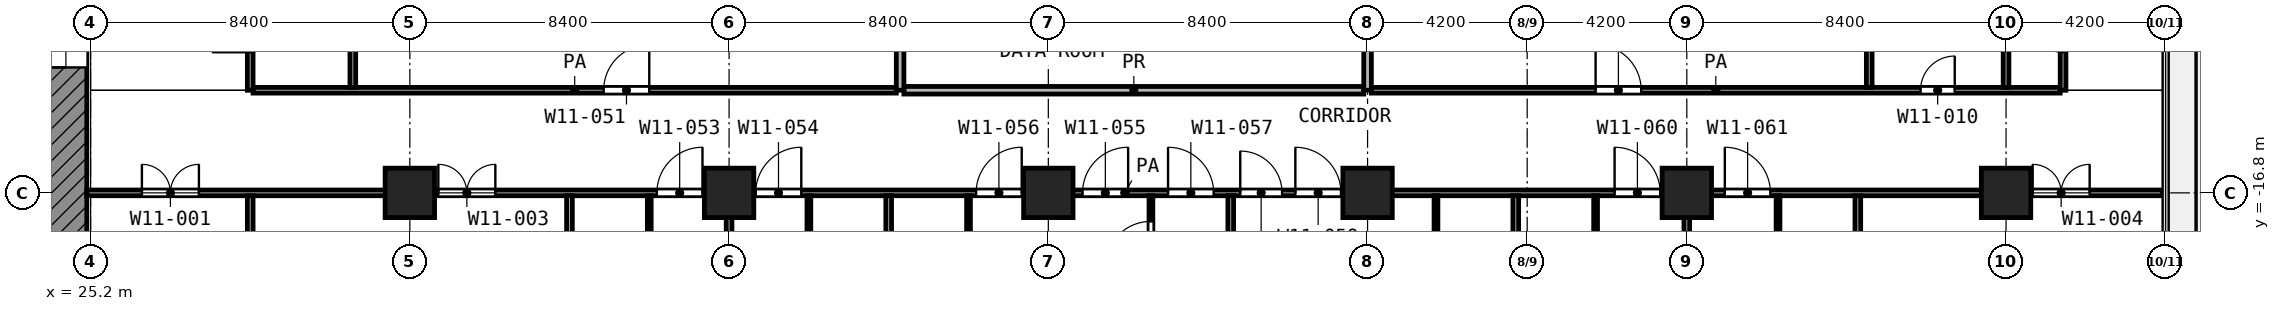
"""IFC4 building model, lengths in metres.
Left out: names, types, materials, properties, quantities, classifications, styles, units other than length and angle.
Written with IfcOpenShell. Run it as: python <this file> out.ifc"""

import sys

from ifc_helpers import new_model, si_unit, direction, frame, frame_2d, origin, origin_2d, place, context, subcontext, project, spatial, rectangle, extrude, element, fill, save


model = new_model("IFC4")
c1 = context("Model", 3, precision=1e-05, world=origin(), true_north=direction((0.0, 1.0)))
c2 = subcontext(c1, "Body", "Model", "MODEL_VIEW")
j1 = project(units=[si_unit("LENGTHUNIT", "METRE"), si_unit("PLANEANGLEUNIT", "RADIAN")], contexts=[c1])
p1 = place(None, origin())
s1 = spatial("IfcSite", under=j1, at=p1, CompositionType="ELEMENT")
p2 = place(p1, origin())
s2 = spatial("IfcBuilding", under=s1, at=p2, CompositionType="ELEMENT")
p3 = place(p2, frame((0.0, 0.0, 51.8)))
s3 = spatial("IfcBuildingStorey", under=s2, at=p3, CompositionType="ELEMENT", Elevation=51.8)
for number, where, z_axis, x_axis in (
    (1, (33.6, -16.8, 0.0), (0.0, 0.0, 1.0), (1.0, 0.0, 0.0)),
    (2, (42.0, -16.8, 0.0), (0.0, 0.0, 1.0), (1.0, 0.0, 0.0)),
    (3, (50.4, -16.8, 0.0), (0.0, 0.0, 1.0), (1.0, 0.0, 0.0)),
    (4, (58.8, -16.8, 0.0), (0.0, 0.0, 1.0), (1.0, 0.0, 0.0)),
    (5, (67.2, -16.8, 0.0), (0.0, 0.0, 1.0), (1.0, 0.0, 0.0)),
    (6, (75.6, -16.8, 0.0), (0.0, 0.0, 1.0), (1.0, 0.0, 0.0)),
):
    element("IfcColumn", number, at=place(p3, frame(where, z_axis=z_axis, x_axis=x_axis)), inside=s3, PredefinedType="COLUMN", context=c2, shape_type="SweptSolid", body=[
        extrude(rectangle(XDim=1.3, YDim=1.3, at=origin_2d()), origin(), (0.0, 0.0, 1.0), 4.2),
    ])
p4 = place(p3, frame((24.55, -24.0, 0.0), z_axis=(0.0, 0.0, 1.0), x_axis=(0.0, 1.0, 0.0)))
e7 = element("IfcWall", 7, at=p4, inside=s3, PredefinedType="SHEAR", context=c2, shape_type="SweptSolid", body=[
    extrude(rectangle(XDim=18.6, YDim=1.1, at=frame_2d((9.3, 0.0))), origin(), (0.0, 0.0, 1.0), 3.9),
])
p5 = place(p4, frame((10.5, 0.0, 0.0)))
e8 = element("IfcOpeningElement", 8, at=p5, cuts=e7, PredefinedType="OPENING", context=c2, shape_type="SweptSolid", body=[
    extrude(rectangle(XDim=1.8, YDim=2.1, at=frame_2d((0.9, 1.05))), frame((0.0, 0.56, 0.0), z_axis=(0.0, -1.0, 0.0), x_axis=(1.0, 0.0, 0.0)), (0.0, 0.0, 1.0), 1.12),
])
p6 = place(p3, frame((39.9, -20.1, 0.0), z_axis=(0.0, 0.0, 1.0), x_axis=(0.0, 1.0, 0.0)))
e9 = element("IfcWall", 9, at=p6, inside=s3, PredefinedType="PARTITIONING", context=c2, shape_type="SweptSolid", body=[
    extrude(rectangle(XDim=3.225, YDim=0.1, at=frame_2d((1.613, 0.0))), origin(), (0.0, 0.0, 1.0), 3.9),
])
for number, where, z_axis, x_axis in (
    (10, (44.1, -19.5, 0.0), (0.0, 0.0, 1.0), (0.0, 1.0, 0.0)),
    (11, (48.3, -19.5, 0.0), (0.0, 0.0, 1.0), (0.0, 1.0, 0.0)),
):
    element("IfcWall", number, at=place(p3, frame(where, z_axis=z_axis, x_axis=x_axis)), inside=s3, PredefinedType="PARTITIONING", context=c2, shape_type="SweptSolid", body=[
        extrude(rectangle(XDim=2.625, YDim=0.1, at=frame_2d((1.312, 0.0))), origin(), (0.0, 0.0, 1.0), 3.9),
    ])
p7 = place(p3, frame((53.1, -19.5, 0.0), z_axis=(0.0, 0.0, 1.0), x_axis=(0.0, 1.0, 0.0)))
e12 = element("IfcWall", 12, at=p7, inside=s3, PredefinedType="PARTITIONING", context=c2, shape_type="SweptSolid", body=[
    extrude(rectangle(XDim=2.625, YDim=0.1, at=frame_2d((1.312, 0.0))), origin(), (0.0, 0.0, 1.0), 3.9),
])
p8 = place(p7, frame((0.75, 0.0, 0.0)))
e13 = element("IfcOpeningElement", 13, at=p8, cuts=e12, PredefinedType="OPENING", context=c2, shape_type="SweptSolid", body=[
    extrude(rectangle(XDim=1.2, YDim=2.1, at=frame_2d((0.6, 1.05))), frame((0.0, 0.06, 0.0), z_axis=(0.0, -1.0, 0.0), x_axis=(1.0, 0.0, 0.0)), (0.0, 0.0, 1.0), 0.12),
])
p9 = place(p3, frame((60.6, -19.499, 0.0), z_axis=(0.0, 0.0, 1.0), x_axis=(0.0, 1.0, 0.0)))
e14 = element("IfcWall", 14, at=p9, inside=s3, PredefinedType="PARTITIONING", context=c2, shape_type="SweptSolid", body=[
    extrude(rectangle(XDim=2.624, YDim=0.1, at=frame_2d((1.312, 0.0))), origin(), (0.0, 0.0, 1.0), 3.9),
])
p10 = place(p3, frame((64.8, -20.1, 0.0), z_axis=(0.0, 0.0, 1.0), x_axis=(0.0, 1.0, 0.0)))
e15 = element("IfcWall", 15, at=p10, inside=s3, PredefinedType="PARTITIONING", context=c2, shape_type="SweptSolid", body=[
    extrude(rectangle(XDim=3.225, YDim=0.1, at=frame_2d((1.613, 0.0))), origin(), (0.0, 0.0, 1.0), 3.9),
])
p11 = place(p3, frame((69.6, -19.5, 0.0), z_axis=(0.0, 0.0, 1.0), x_axis=(0.0, 1.0, 0.0)))
e16 = element("IfcWall", 16, at=p11, inside=s3, PredefinedType="PARTITIONING", context=c2, shape_type="SweptSolid", body=[
    extrude(rectangle(XDim=2.625, YDim=0.1, at=frame_2d((1.312, 0.0))), origin(), (0.0, 0.0, 1.0), 3.9),
])
p12 = place(p3, frame((25.1, -16.8, 0.0), z_axis=(0.0, 0.0, 1.0), x_axis=(1.0, 0.0, 0.0)))
e17 = element("IfcWall", 17, at=p12, inside=s3, PredefinedType="PARTITIONING", context=c2, shape_type="SweptSolid", body=[
    extrude(rectangle(XDim=54.62, YDim=0.15, at=frame_2d((27.31, 0.0))), origin(), (0.0, 0.0, 1.0), 3.9),
])
p13 = place(p12, frame((1.45, 0.0, 0.0)))
e18 = element("IfcOpeningElement", 18, at=p13, cuts=e17, PredefinedType="OPENING", context=c2, shape_type="SweptSolid", body=[
    extrude(rectangle(XDim=1.5, YDim=2.1, at=frame_2d((0.75, 1.05))), frame((0.0, 0.085, 0.0), z_axis=(0.0, -1.0, 0.0), x_axis=(1.0, 0.0, 0.0)), (0.0, 0.0, 1.0), 0.17),
])
p14 = place(p12, frame((9.25, 0.0, 0.0)))
e19 = element("IfcOpeningElement", 19, at=p14, cuts=e17, PredefinedType="OPENING", context=c2, shape_type="SweptSolid", body=[
    extrude(rectangle(XDim=1.5, YDim=2.1, at=frame_2d((0.75, 1.05))), frame((0.0, 0.085, 0.0), z_axis=(0.0, -1.0, 0.0), x_axis=(1.0, 0.0, 0.0)), (0.0, 0.0, 1.0), 0.17),
])
p15 = place(p12, frame((15.0, 0.0, 0.0)))
e20 = element("IfcOpeningElement", 20, at=p15, cuts=e17, PredefinedType="OPENING", context=c2, shape_type="SweptSolid", body=[
    extrude(rectangle(XDim=1.2, YDim=2.1, at=frame_2d((0.6, 1.05))), frame((0.0, 0.085, 0.0), z_axis=(0.0, -1.0, 0.0), x_axis=(1.0, 0.0, 0.0)), (0.0, 0.0, 1.0), 0.17),
])
p16 = place(p12, frame((17.6, 0.0, 0.0)))
e21 = element("IfcOpeningElement", 21, at=p16, cuts=e17, PredefinedType="OPENING", context=c2, shape_type="SweptSolid", body=[
    extrude(rectangle(XDim=1.2, YDim=2.1, at=frame_2d((0.6, 1.05))), frame((0.0, 0.085, 0.0), z_axis=(0.0, -1.0, 0.0), x_axis=(1.0, 0.0, 0.0)), (0.0, 0.0, 1.0), 0.17),
])
p17 = place(p12, frame((26.2, 0.0, 0.0)))
e22 = element("IfcOpeningElement", 22, at=p17, cuts=e17, PredefinedType="OPENING", context=c2, shape_type="SweptSolid", body=[
    extrude(rectangle(XDim=1.2, YDim=2.1, at=frame_2d((0.6, 1.05))), frame((0.0, 0.085, 0.0), z_axis=(0.0, -1.0, 0.0), x_axis=(1.0, 0.0, 0.0)), (0.0, 0.0, 1.0), 0.17),
])
p18 = place(p12, frame((23.4, 0.0, 0.0)))
e23 = element("IfcOpeningElement", 23, at=p18, cuts=e17, PredefinedType="OPENING", context=c2, shape_type="SweptSolid", body=[
    extrude(rectangle(XDim=1.2, YDim=2.1, at=frame_2d((0.6, 1.05))), frame((0.0, 0.085, 0.0), z_axis=(0.0, -1.0, 0.0), x_axis=(1.0, 0.0, 0.0)), (0.0, 0.0, 1.0), 0.17),
])
p19 = place(p12, frame((28.45, 0.0, 0.0)))
e24 = element("IfcOpeningElement", 24, at=p19, cuts=e17, PredefinedType="OPENING", context=c2, shape_type="SweptSolid", body=[
    extrude(rectangle(XDim=1.2, YDim=2.1, at=frame_2d((0.6, 1.05))), frame((0.0, 0.085, 0.0), z_axis=(0.0, -1.0, 0.0), x_axis=(1.0, 0.0, 0.0)), (0.0, 0.0, 1.0), 0.17),
])
p20 = place(p12, frame((31.8, 0.0, 0.0)))
e25 = element("IfcOpeningElement", 25, at=p20, cuts=e17, PredefinedType="OPENING", context=c2, shape_type="SweptSolid", body=[
    extrude(rectangle(XDim=1.2, YDim=2.1, at=frame_2d((0.6, 1.05))), frame((0.0, 0.085, 0.0), z_axis=(0.0, -1.0, 0.0), x_axis=(1.0, 0.0, 0.0)), (0.0, 0.0, 1.0), 0.17),
])
p21 = place(p12, frame((30.35, 0.0, 0.0)))
e26 = element("IfcOpeningElement", 26, at=p21, cuts=e17, PredefinedType="OPENING", context=c2, shape_type="SweptSolid", body=[
    extrude(rectangle(XDim=1.1, YDim=2.1, at=frame_2d((0.55, 1.05))), frame((0.0, 0.085, 0.0), z_axis=(0.0, -1.0, 0.0), x_axis=(1.0, 0.0, 0.0)), (0.0, 0.0, 1.0), 0.17),
])
p22 = place(p12, frame((40.2, 0.0, 0.0)))
e27 = element("IfcOpeningElement", 27, at=p22, cuts=e17, PredefinedType="OPENING", context=c2, shape_type="SweptSolid", body=[
    extrude(rectangle(XDim=1.2, YDim=2.1, at=frame_2d((0.6, 1.05))), frame((0.0, 0.085, 0.0), z_axis=(0.0, -1.0, 0.0), x_axis=(1.0, 0.0, 0.0)), (0.0, 0.0, 1.0), 0.17),
])
p23 = place(p12, frame((43.1, 0.0, 0.0)))
e28 = element("IfcOpeningElement", 28, at=p23, cuts=e17, PredefinedType="OPENING", context=c2, shape_type="SweptSolid", body=[
    extrude(rectangle(XDim=1.2, YDim=2.1, at=frame_2d((0.6, 1.05))), frame((0.0, 0.085, 0.0), z_axis=(0.0, -1.0, 0.0), x_axis=(1.0, 0.0, 0.0)), (0.0, 0.0, 1.0), 0.17),
])
p24 = place(p12, frame((51.2, 0.0, 0.0)))
e29 = element("IfcOpeningElement", 29, at=p24, cuts=e17, PredefinedType="OPENING", context=c2, shape_type="SweptSolid", body=[
    extrude(rectangle(XDim=1.5, YDim=2.1, at=frame_2d((0.75, 1.05))), frame((0.0, 0.085, 0.0), z_axis=(0.0, -1.0, 0.0), x_axis=(1.0, 0.0, 0.0)), (0.0, 0.0, 1.0), 0.17),
])
p25 = place(p3, frame((29.475, -14.1, 0.0), z_axis=(0.0, 0.0, 1.0), x_axis=(1.0, 0.0, 0.0)))
e30 = element("IfcWall", 30, at=p25, inside=s3, PredefinedType="PARTITIONING", context=c2, shape_type="SweptSolid", body=[
    extrude(rectangle(XDim=16.925, YDim=0.15, at=frame_2d((8.462, 0.0))), origin(), (0.0, 0.0, 1.0), 3.9),
])
p26 = place(p25, frame((9.225, 0.0, 0.0)))
e31 = element("IfcOpeningElement", 31, at=p26, cuts=e30, PredefinedType="OPENING", context=c2, shape_type="SweptSolid", body=[
    extrude(rectangle(XDim=1.2, YDim=2.1, at=frame_2d((0.6, 1.05))), frame((0.0, 0.085, 0.0), z_axis=(0.0, -1.0, 0.0), x_axis=(1.0, 0.0, 0.0)), (0.0, 0.0, 1.0), 0.17),
])
p27 = place(p3, frame((58.9, -14.1, 0.0), z_axis=(0.0, 0.0, 1.0), x_axis=(1.0, 0.0, 0.0)))
e32 = element("IfcWall", 32, at=p27, inside=s3, PredefinedType="PARTITIONING", context=c2, shape_type="SweptSolid", body=[
    extrude(rectangle(XDim=18.125, YDim=0.15, at=frame_2d((9.062, 0.0))), origin(), (0.0, 0.0, 1.0), 3.9),
])
p28 = place(p27, frame((5.9, 0.0, 0.0)))
e33 = element("IfcOpeningElement", 33, at=p28, cuts=e32, PredefinedType="OPENING", context=c2, shape_type="SweptSolid", body=[
    extrude(rectangle(XDim=1.2, YDim=2.1, at=frame_2d((0.6, 1.05))), frame((0.0, 0.085, 0.0), z_axis=(0.0, -1.0, 0.0), x_axis=(1.0, 0.0, 0.0)), (0.0, 0.0, 1.0), 0.17),
])
p29 = place(p27, frame((14.45, 0.0, 0.0)))
e34 = element("IfcOpeningElement", 34, at=p29, cuts=e32, PredefinedType="OPENING", context=c2, shape_type="SweptSolid", body=[
    extrude(rectangle(XDim=0.9, YDim=2.1, at=frame_2d((0.45, 1.05))), frame((0.0, 0.085, 0.0), z_axis=(0.0, -1.0, 0.0), x_axis=(1.0, 0.0, 0.0)), (0.0, 0.0, 1.0), 0.17),
])
p30 = place(p3, frame((29.4, -25.2, 0.0), z_axis=(0.0, 0.0, 1.0), x_axis=(0.0, 1.0, 0.0)))
e35 = element("IfcWall", 35, at=p30, inside=s3, PredefinedType="PARTITIONING", context=c2, shape_type="SweptSolid", body=[
    extrude(rectangle(XDim=8.325, YDim=0.15, at=frame_2d((4.163, 0.0))), origin(), (0.0, 0.0, 1.0), 3.9),
])
p31 = place(p3, frame((29.4, -14.1, 0.0), z_axis=(0.0, 0.0, 1.0), x_axis=(0.0, 1.0, 0.0)))
e36 = element("IfcWall", 36, at=p31, inside=s3, PredefinedType="PARTITIONING", context=c2, shape_type="SweptSolid", body=[
    extrude(rectangle(XDim=3.0, YDim=0.15, at=frame_2d((1.5, 0.0))), origin(), (0.0, 0.0, 1.0), 3.9),
])
p32 = place(p31, frame((1.0, 0.0, 0.0)))
e37 = element("IfcOpeningElement", 37, at=p32, cuts=e36, PredefinedType="OPENING", context=c2, shape_type="SweptSolid", body=[
    extrude(rectangle(XDim=1.0, YDim=2.1, at=frame_2d((0.5, 1.05))), frame((0.0, 0.085, 0.0), z_axis=(0.0, -1.0, 0.0), x_axis=(1.0, 0.0, 0.0)), (0.0, 0.0, 1.0), 0.17),
])
p33 = place(p3, frame((32.1, -14.025, 0.0), z_axis=(0.0, 0.0, 1.0), x_axis=(0.0, 1.0, 0.0)))
e38 = element("IfcWall", 38, at=p33, inside=s3, PredefinedType="PARTITIONING", context=c2, shape_type="SweptSolid", body=[
    extrude(rectangle(XDim=2.85, YDim=0.15, at=frame_2d((1.425, 0.0))), origin(), (0.0, 0.0, 1.0), 3.9),
])
for number, where, z_axis, x_axis in (
    (39, (37.8, -25.12, 0.0), (0.0, 0.0, 1.0), (0.0, 1.0, 0.0)),
    (40, (42.0, -25.12, 0.0), (0.0, 0.0, 1.0), (0.0, 1.0, 0.0)),
    (41, (46.2, -25.12, 0.0), (0.0, 0.0, 1.0), (0.0, 1.0, 0.0)),
    (42, (55.2, -25.12, 0.0), (0.0, 0.0, 1.0), (0.0, 1.0, 0.0)),
    (43, (62.7, -25.12, 0.0), (0.0, 0.0, 1.0), (0.0, 1.0, 0.0)),
    (44, (67.2, -25.12, 0.0), (0.0, 0.0, 1.0), (0.0, 1.0, 0.0)),
    (45, (71.7, -25.12, 0.0), (0.0, 0.0, 1.0), (0.0, 1.0, 0.0)),
):
    element("IfcWall", number, at=place(p3, frame(where, z_axis=z_axis, x_axis=x_axis)), inside=s3, PredefinedType="PARTITIONING", context=c2, shape_type="SweptSolid", body=[
        extrude(rectangle(XDim=8.245, YDim=0.15, at=frame_2d((4.123, 0.0))), origin(), (0.0, 0.0, 1.0), 3.9),
    ])
for number, where, z_axis, x_axis in (
    (46, (72.0, -14.025, 0.0), (0.0, 0.0, 1.0), (0.0, 1.0, 0.0)),
    (47, (75.6, -14.025, 0.0), (0.0, 0.0, 1.0), (0.0, 1.0, 0.0)),
):
    element("IfcWall", number, at=place(p3, frame(where, z_axis=z_axis, x_axis=x_axis)), inside=s3, PredefinedType="PARTITIONING", context=c2, shape_type="SweptSolid", body=[
        extrude(rectangle(XDim=2.85, YDim=0.15, at=frame_2d((1.425, 0.0))), origin(), (0.0, 0.0, 1.0), 3.9),
    ])
p34 = place(p3, frame((77.1, -14.1, 0.0), z_axis=(0.0, 0.0, 1.0), x_axis=(0.0, 1.0, 0.0)))
e48 = element("IfcWall", 48, at=p34, inside=s3, PredefinedType="PARTITIONING", context=c2, shape_type="SweptSolid", body=[
    extrude(rectangle(XDim=3.0, YDim=0.15, at=frame_2d((1.5, 0.0))), origin(), (0.0, 0.0, 1.0), 3.9),
])
p35 = place(p34, frame((1.0, 0.0, 0.0)))
e49 = element("IfcOpeningElement", 49, at=p35, cuts=e48, PredefinedType="OPENING", context=c2, shape_type="SweptSolid", body=[
    extrude(rectangle(XDim=1.0, YDim=2.1, at=frame_2d((0.5, 1.05))), frame((0.0, 0.085, 0.0), z_axis=(0.0, -1.0, 0.0), x_axis=(1.0, 0.0, 0.0)), (0.0, 0.0, 1.0), 0.17),
])
p36 = place(p3, frame((46.6, -14.1, 0.0), z_axis=(0.0, 0.0, 1.0), x_axis=(1.0, 0.0, 0.0)))
e50 = element("IfcWall", 50, at=p36, inside=s3, PredefinedType="PARTITIONING", context=c2, shape_type="SweptSolid", body=[
    extrude(rectangle(XDim=12.1, YDim=0.2, at=frame_2d((6.05, 0.0))), origin(), (0.0, 0.0, 1.0), 3.9),
])
for number, where, z_axis, x_axis in (
    (51, (46.5, -14.1, 0.0), (0.0, 0.0, 1.0), (0.0, 1.0, 0.0)),
    (52, (58.8, -14.1, 0.0), (0.0, 0.0, 1.0), (0.0, 1.0, 0.0)),
):
    element("IfcWall", number, at=place(p3, frame(where, z_axis=z_axis, x_axis=x_axis)), inside=s3, PredefinedType="PARTITIONING", context=c2, shape_type="SweptSolid", body=[
        extrude(rectangle(XDim=3.0, YDim=0.2, at=frame_2d((1.5, 0.0))), origin(), (0.0, 0.0, 1.0), 3.9),
    ])
p37 = place(p5, origin())
e53 = element("IfcDoor", 53, at=p37, inside=s3, OperationType="DOUBLE_DOOR_SINGLE_SWING", PredefinedType="DOOR", context=c2, shape_type="SweptSolid", body=[
    extrude(rectangle(XDim=1.8, YDim=2.1, at=frame_2d((0.9, 1.05))), frame((0.0, 0.025, 0.0), z_axis=(0.0, -1.0, 0.0), x_axis=(1.0, 0.0, 0.0)), (0.0, 0.0, 1.0), 0.05),
])
fill(e8, e53)
p38 = place(p13, origin())
e54 = element("IfcDoor", 54, at=p38, inside=s3, OperationType="DOUBLE_DOOR_SINGLE_SWING", PredefinedType="DOOR", context=c2, shape_type="SweptSolid", body=[
    extrude(rectangle(XDim=1.5, YDim=2.1, at=frame_2d((0.75, 1.05))), frame((0.0, 0.025, 0.0), z_axis=(0.0, -1.0, 0.0), x_axis=(1.0, 0.0, 0.0)), (0.0, 0.0, 1.0), 0.05),
])
fill(e18, e54)
p39 = place(p26, origin())
e55 = element("IfcDoor", 55, at=p39, inside=s3, OperationType="SINGLE_SWING_RIGHT", PredefinedType="DOOR", context=c2, shape_type="SweptSolid", body=[
    extrude(rectangle(XDim=1.2, YDim=2.1, at=frame_2d((0.6, 1.05))), frame((0.0, 0.025, 0.0), z_axis=(0.0, -1.0, 0.0), x_axis=(1.0, 0.0, 0.0)), (0.0, 0.0, 1.0), 0.05),
])
fill(e31, e55)
p40 = place(p28, origin())
e56 = element("IfcDoor", 56, at=p40, inside=s3, OperationType="SINGLE_SWING_LEFT", PredefinedType="DOOR", context=c2, shape_type="SweptSolid", body=[
    extrude(rectangle(XDim=1.2, YDim=2.1, at=frame_2d((0.6, 1.05))), frame((0.0, 0.025, 0.0), z_axis=(0.0, -1.0, 0.0), x_axis=(1.0, 0.0, 0.0)), (0.0, 0.0, 1.0), 0.05),
])
fill(e33, e56)
p41 = place(p29, origin())
e57 = element("IfcDoor", 57, at=p41, inside=s3, OperationType="SINGLE_SWING_RIGHT", PredefinedType="DOOR", context=c2, shape_type="SweptSolid", body=[
    extrude(rectangle(XDim=0.9, YDim=2.1, at=frame_2d((0.45, 1.05))), frame((0.0, 0.025, 0.0), z_axis=(0.0, -1.0, 0.0), x_axis=(1.0, 0.0, 0.0)), (0.0, 0.0, 1.0), 0.05),
])
fill(e34, e57)
p42 = place(p14, origin())
e58 = element("IfcDoor", 58, at=p42, inside=s3, OperationType="DOUBLE_DOOR_SINGLE_SWING", PredefinedType="DOOR", context=c2, shape_type="SweptSolid", body=[
    extrude(rectangle(XDim=1.5, YDim=2.1, at=frame_2d((0.75, 1.05))), frame((0.0, 0.025, 0.0), z_axis=(0.0, -1.0, 0.0), x_axis=(1.0, 0.0, 0.0)), (0.0, 0.0, 1.0), 0.05),
])
fill(e19, e58)
p43 = place(p15, origin())
e59 = element("IfcDoor", 59, at=p43, inside=s3, OperationType="SINGLE_SWING_RIGHT", PredefinedType="DOOR", context=c2, shape_type="SweptSolid", body=[
    extrude(rectangle(XDim=1.2, YDim=2.1, at=frame_2d((0.6, 1.05))), frame((0.0, 0.025, 0.0), z_axis=(0.0, -1.0, 0.0), x_axis=(1.0, 0.0, 0.0)), (0.0, 0.0, 1.0), 0.05),
])
fill(e20, e59)
p44 = place(p16, origin())
e60 = element("IfcDoor", 60, at=p44, inside=s3, OperationType="SINGLE_SWING_RIGHT", PredefinedType="DOOR", context=c2, shape_type="SweptSolid", body=[
    extrude(rectangle(XDim=1.2, YDim=2.1, at=frame_2d((0.6, 1.05))), frame((0.0, 0.025, 0.0), z_axis=(0.0, -1.0, 0.0), x_axis=(1.0, 0.0, 0.0)), (0.0, 0.0, 1.0), 0.05),
])
fill(e21, e60)
p45 = place(p17, origin())
e61 = element("IfcDoor", 61, at=p45, inside=s3, OperationType="SINGLE_SWING_RIGHT", PredefinedType="DOOR", context=c2, shape_type="SweptSolid", body=[
    extrude(rectangle(XDim=1.2, YDim=2.1, at=frame_2d((0.6, 1.05))), frame((0.0, 0.025, 0.0), z_axis=(0.0, -1.0, 0.0), x_axis=(1.0, 0.0, 0.0)), (0.0, 0.0, 1.0), 0.05),
])
fill(e22, e61)
p46 = place(p18, origin())
e62 = element("IfcDoor", 62, at=p46, inside=s3, OperationType="SINGLE_SWING_RIGHT", PredefinedType="DOOR", context=c2, shape_type="SweptSolid", body=[
    extrude(rectangle(XDim=1.2, YDim=2.1, at=frame_2d((0.6, 1.05))), frame((0.0, 0.025, 0.0), z_axis=(0.0, -1.0, 0.0), x_axis=(1.0, 0.0, 0.0)), (0.0, 0.0, 1.0), 0.05),
])
fill(e23, e62)
p47 = place(p19, origin())
e63 = element("IfcDoor", 63, at=p47, inside=s3, OperationType="SINGLE_SWING_LEFT", PredefinedType="DOOR", context=c2, shape_type="SweptSolid", body=[
    extrude(rectangle(XDim=1.2, YDim=2.1, at=frame_2d((0.6, 1.05))), frame((0.0, 0.025, 0.0), z_axis=(0.0, -1.0, 0.0), x_axis=(1.0, 0.0, 0.0)), (0.0, 0.0, 1.0), 0.05),
])
fill(e24, e63)
p48 = place(p8, origin())
e64 = element("IfcDoor", 64, at=p48, inside=s3, OperationType="SINGLE_SWING_LEFT", PredefinedType="DOOR", context=c2, shape_type="SweptSolid", body=[
    extrude(rectangle(XDim=1.2, YDim=2.1, at=frame_2d((0.6, 1.05))), frame((0.0, 0.025, 0.0), z_axis=(0.0, -1.0, 0.0), x_axis=(1.0, 0.0, 0.0)), (0.0, 0.0, 1.0), 0.05),
])
fill(e13, e64)
p49 = place(p20, origin())
e65 = element("IfcDoor", 65, at=p49, inside=s3, OperationType="SINGLE_SWING_LEFT", PredefinedType="DOOR", context=c2, shape_type="SweptSolid", body=[
    extrude(rectangle(XDim=1.2, YDim=2.1, at=frame_2d((0.6, 1.05))), frame((0.0, 0.025, 0.0), z_axis=(0.0, -1.0, 0.0), x_axis=(1.0, 0.0, 0.0)), (0.0, 0.0, 1.0), 0.05),
])
fill(e25, e65)
p50 = place(p21, origin())
e66 = element("IfcDoor", 66, at=p50, inside=s3, OperationType="SINGLE_SWING_LEFT", PredefinedType="DOOR", context=c2, shape_type="SweptSolid", body=[
    extrude(rectangle(XDim=1.1, YDim=2.1, at=frame_2d((0.55, 1.05))), frame((0.0, 0.025, 0.0), z_axis=(0.0, -1.0, 0.0), x_axis=(1.0, 0.0, 0.0)), (0.0, 0.0, 1.0), 0.05),
])
fill(e26, e66)
p51 = place(p22, origin())
e67 = element("IfcDoor", 67, at=p51, inside=s3, OperationType="SINGLE_SWING_LEFT", PredefinedType="DOOR", context=c2, shape_type="SweptSolid", body=[
    extrude(rectangle(XDim=1.2, YDim=2.1, at=frame_2d((0.6, 1.05))), frame((0.0, 0.025, 0.0), z_axis=(0.0, -1.0, 0.0), x_axis=(1.0, 0.0, 0.0)), (0.0, 0.0, 1.0), 0.05),
])
fill(e27, e67)
p52 = place(p23, origin())
e68 = element("IfcDoor", 68, at=p52, inside=s3, OperationType="SINGLE_SWING_LEFT", PredefinedType="DOOR", context=c2, shape_type="SweptSolid", body=[
    extrude(rectangle(XDim=1.2, YDim=2.1, at=frame_2d((0.6, 1.05))), frame((0.0, 0.025, 0.0), z_axis=(0.0, -1.0, 0.0), x_axis=(1.0, 0.0, 0.0)), (0.0, 0.0, 1.0), 0.05),
])
fill(e28, e68)
p53 = place(p24, origin())
e69 = element("IfcDoor", 69, at=p53, inside=s3, OperationType="DOUBLE_DOOR_SINGLE_SWING", PredefinedType="DOOR", context=c2, shape_type="SweptSolid", body=[
    extrude(rectangle(XDim=1.5, YDim=2.1, at=frame_2d((0.75, 1.05))), frame((0.0, 0.025, 0.0), z_axis=(0.0, -1.0, 0.0), x_axis=(1.0, 0.0, 0.0)), (0.0, 0.0, 1.0), 0.05),
])
fill(e29, e69)
save(model, sys.argv[1])
